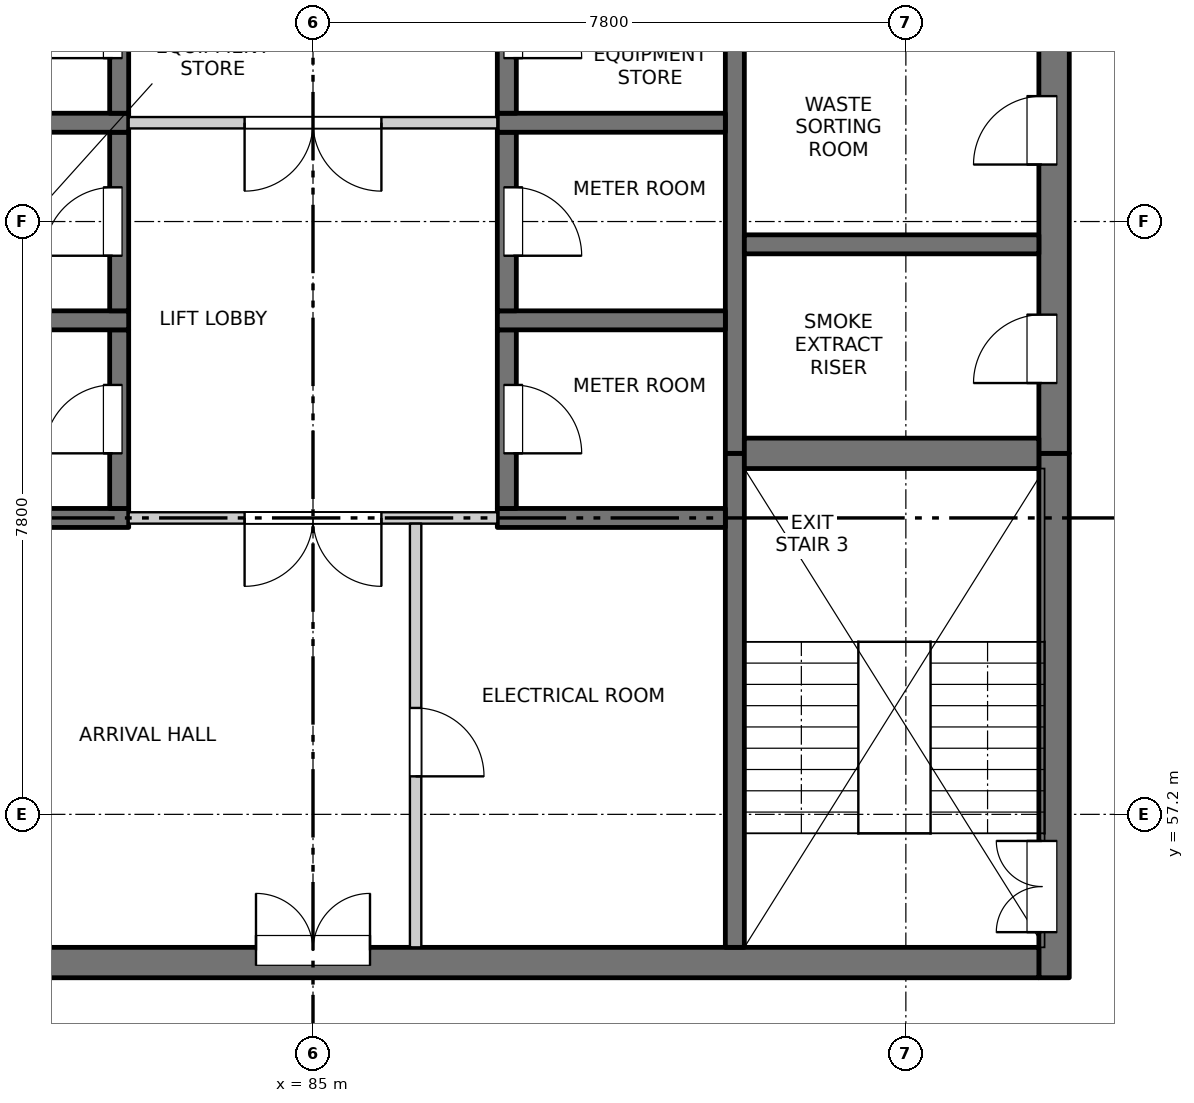
"""IFC4 building model, lengths in metres.
Left out: names, types, materials, properties, quantities, classifications, styles, units other than length and angle.
Written with IfcOpenShell. Run it as: python <this file> out.ifc"""

import sys

from ifc_helpers import new_model, si_unit, direction, frame, frame_2d, origin, place, context, subcontext, project, spatial, rectangle, extrude, element, fill, save


model = new_model("IFC4")
c1 = context("Model", 3, precision=1e-05, world=origin(), true_north=direction((0.0, 1.0)))
c2 = subcontext(c1, "Body", "Model", "MODEL_VIEW")
j1 = project(units=[si_unit("LENGTHUNIT", "METRE"), si_unit("PLANEANGLEUNIT", "RADIAN")], contexts=[c1])
p1 = place(None, origin())
s1 = spatial("IfcSite", under=j1, at=p1, CompositionType="ELEMENT")
p2 = place(p1, origin())
s2 = spatial("IfcBuilding", under=s1, at=p2, CompositionType="ELEMENT")
p3 = place(p2, frame((0.0, 0.0, 259.6)))
s3 = spatial("IfcBuildingStorey", under=s2, at=p3, CompositionType="ELEMENT", Elevation=259.6)
p4 = place(p3, frame((94.75, 55.05, -0.25), z_axis=(0.0, 0.0, 1.0), x_axis=(0.0, 1.0, 0.0)))
e1 = element("IfcWall", 1, at=p4, inside=s3, PredefinedType="SOLIDWALL", context=c2, shape_type="SweptSolid", body=[
    extrude(rectangle(XDim=6.9, YDim=0.4, at=frame_2d((3.45, 0.0))), origin(), (0.0, 0.0, 1.0), 3.4),
])
p5 = place(p4, frame((0.6, 0.0, 0.25)))
e2 = element("IfcOpeningElement", 2, at=p5, cuts=e1, PredefinedType="OPENING", context=c2, shape_type="SweptSolid", body=[
    extrude(rectangle(XDim=1.2, YDim=2.1, at=frame_2d((0.6, 1.05))), frame((0.0, 0.21, 0.0), z_axis=(0.0, -1.0, 0.0), x_axis=(1.0, 0.0, 0.0)), (0.0, 0.0, 1.0), 0.42),
])
p6 = place(p3, frame((94.75, 61.95, -0.25), z_axis=(0.0, 0.0, 1.0), x_axis=(0.0, 1.0, 0.0)))
e3 = element("IfcWall", 3, at=p6, inside=s3, PredefinedType="SOLIDWALL", context=c2, shape_type="SweptSolid", body=[
    extrude(rectangle(XDim=15.35, YDim=0.4, at=frame_2d((7.675, 0.0))), origin(), (0.0, 0.0, 1.0), 3.4),
])
p7 = place(p6, frame((0.925, 0.0, 0.25)))
e4 = element("IfcOpeningElement", 4, at=p7, cuts=e3, PredefinedType="OPENING", context=c2, shape_type="SweptSolid", body=[
    extrude(rectangle(XDim=0.9, YDim=2.1, at=frame_2d((0.45, 1.05))), frame((0.0, 0.21, 0.0), z_axis=(0.0, -1.0, 0.0), x_axis=(1.0, 0.0, 0.0)), (0.0, 0.0, 1.0), 0.42),
])
p8 = place(p6, frame((3.8, 0.0, 0.25)))
e5 = element("IfcOpeningElement", 5, at=p8, cuts=e3, PredefinedType="OPENING", context=c2, shape_type="SweptSolid", body=[
    extrude(rectangle(XDim=0.9, YDim=2.1, at=frame_2d((0.45, 1.05))), frame((0.0, 0.21, 0.0), z_axis=(0.0, -1.0, 0.0), x_axis=(1.0, 0.0, 0.0)), (0.0, 0.0, 1.0), 0.42),
])
p9 = place(p6, frame((8.3, 0.0, 0.25)))
e6 = element("IfcOpeningElement", 6, at=p9, cuts=e3, PredefinedType="OPENING", context=c2, shape_type="SweptSolid", body=[
    extrude(rectangle(XDim=0.9, YDim=2.1, at=frame_2d((0.45, 1.05))), frame((0.0, 0.21, 0.0), z_axis=(0.0, -1.0, 0.0), x_axis=(1.0, 0.0, 0.0)), (0.0, 0.0, 1.0), 0.42),
])
p10 = place(p6, frame((13.1, 0.0, 0.25)))
e7 = element("IfcOpeningElement", 7, at=p10, cuts=e3, PredefinedType="OPENING", context=c2, shape_type="SweptSolid", body=[
    extrude(rectangle(XDim=0.9, YDim=2.1, at=frame_2d((0.45, 1.05))), frame((0.0, 0.21, 0.0), z_axis=(0.0, -1.0, 0.0), x_axis=(1.0, 0.0, 0.0)), (0.0, 0.0, 1.0), 0.42),
])
p11 = place(p3, frame((75.45, 55.25, -0.25), z_axis=(0.0, 0.0, 1.0), x_axis=(1.0, 0.0, 0.0)))
e8 = element("IfcWall", 8, at=p11, inside=s3, PredefinedType="SOLIDWALL", context=c2, shape_type="SweptSolid", body=[
    extrude(rectangle(XDim=19.1, YDim=0.4, at=frame_2d((9.55, 0.0))), origin(), (0.0, 0.0, 1.0), 3.4),
])
p12 = place(p11, frame((8.8, 0.0, 0.25)))
e9 = element("IfcOpeningElement", 9, at=p12, cuts=e8, PredefinedType="OPENING", context=c2, shape_type="SweptSolid", body=[
    extrude(rectangle(XDim=1.5, YDim=2.1, at=frame_2d((0.75, 1.05))), frame((0.0, 0.21, 0.0), z_axis=(0.0, -1.0, 0.0), x_axis=(1.0, 0.0, 0.0)), (0.0, 0.0, 1.0), 0.42),
])
p13 = place(p3, frame((90.55, 55.45, -0.25), z_axis=(0.0, 0.0, 1.0), x_axis=(0.0, 1.0, 0.0)))
e10 = element("IfcWall", 10, at=p13, inside=s3, PredefinedType="SOLIDWALL", context=c2, shape_type="SweptSolid", body=[
    extrude(rectangle(XDim=6.5, YDim=0.25, at=frame_2d((3.25, 0.0))), origin(), (0.0, 0.0, 1.0), 3.4),
])
p14 = place(p3, frame((90.55, 61.95, -0.25), z_axis=(0.0, 0.0, 1.0), x_axis=(0.0, 1.0, 0.0)))
e11 = element("IfcWall", 11, at=p14, inside=s3, PredefinedType="SOLIDWALL", context=c2, shape_type="SweptSolid", body=[
    extrude(rectangle(XDim=15.35, YDim=0.25, at=frame_2d((7.675, 0.0))), origin(), (0.0, 0.0, 1.0), 3.4),
])
p15 = place(p3, frame((79.575, 61.1, -0.25), z_axis=(0.0, 0.0, 1.0), x_axis=(1.0, 0.0, 0.0)))
e12 = element("IfcWall", 12, at=p15, inside=s3, PredefinedType="SOLIDWALL", context=c2, shape_type="SweptSolid", body=[
    extrude(rectangle(XDim=3.0, YDim=0.25, at=frame_2d((1.5, 0.0))), origin(), (0.0, 0.0, 1.0), 3.4),
])
p16 = place(p3, frame((82.45, 61.225, -0.25), z_axis=(0.0, 0.0, 1.0), x_axis=(0.0, 1.0, 0.0)))
e13 = element("IfcWall", 13, at=p16, inside=s3, PredefinedType="SOLIDWALL", context=c2, shape_type="SweptSolid", body=[
    extrude(rectangle(XDim=2.35, YDim=0.25, at=frame_2d((1.175, 0.0))), origin(), (0.0, 0.0, 1.0), 3.4),
])
p17 = place(p16, frame((0.725, 0.0, 0.25)))
e14 = element("IfcOpeningElement", 14, at=p17, cuts=e13, PredefinedType="OPENING", context=c2, shape_type="SweptSolid", body=[
    extrude(rectangle(XDim=0.9, YDim=2.1, at=frame_2d((0.45, 1.05))), frame((0.0, 0.135, 0.0), z_axis=(0.0, -1.0, 0.0), x_axis=(1.0, 0.0, 0.0)), (0.0, 0.0, 1.0), 0.27),
])
p18 = place(p3, frame((79.575, 63.7, -0.25), z_axis=(0.0, 0.0, 1.0), x_axis=(1.0, 0.0, 0.0)))
e15 = element("IfcWall", 15, at=p18, inside=s3, PredefinedType="SOLIDWALL", context=c2, shape_type="SweptSolid", body=[
    extrude(rectangle(XDim=3.0, YDim=0.25, at=frame_2d((1.5, 0.0))), origin(), (0.0, 0.0, 1.0), 3.4),
])
p19 = place(p3, frame((82.45, 63.825, -0.25), z_axis=(0.0, 0.0, 1.0), x_axis=(0.0, 1.0, 0.0)))
e16 = element("IfcWall", 16, at=p19, inside=s3, PredefinedType="SOLIDWALL", context=c2, shape_type="SweptSolid", body=[
    extrude(rectangle(XDim=2.35, YDim=0.25, at=frame_2d((1.175, 0.0))), origin(), (0.0, 0.0, 1.0), 3.4),
])
p20 = place(p19, frame((0.725, 0.0, 0.25)))
e17 = element("IfcOpeningElement", 17, at=p20, cuts=e16, PredefinedType="OPENING", context=c2, shape_type="SweptSolid", body=[
    extrude(rectangle(XDim=0.9, YDim=2.1, at=frame_2d((0.45, 1.05))), frame((0.0, 0.135, 0.0), z_axis=(0.0, -1.0, 0.0), x_axis=(1.0, 0.0, 0.0)), (0.0, 0.0, 1.0), 0.27),
])
p21 = place(p3, frame((79.575, 66.3, -0.25), z_axis=(0.0, 0.0, 1.0), x_axis=(1.0, 0.0, 0.0)))
e18 = element("IfcWall", 18, at=p21, inside=s3, PredefinedType="SOLIDWALL", context=c2, shape_type="SweptSolid", body=[
    extrude(rectangle(XDim=3.0, YDim=0.25, at=frame_2d((1.5, 0.0))), origin(), (0.0, 0.0, 1.0), 3.4),
])
p22 = place(p3, frame((82.45, 66.425, -0.25), z_axis=(0.0, 0.0, 1.0), x_axis=(0.0, 1.0, 0.0)))
e19 = element("IfcWall", 19, at=p22, inside=s3, PredefinedType="SOLIDWALL", context=c2, shape_type="SweptSolid", body=[
    extrude(rectangle(XDim=2.35, YDim=0.25, at=frame_2d((1.175, 0.0))), origin(), (0.0, 0.0, 1.0), 3.4),
])
p23 = place(p22, frame((0.725, 0.0, 0.25)))
e20 = element("IfcOpeningElement", 20, at=p23, cuts=e19, PredefinedType="OPENING", context=c2, shape_type="SweptSolid", body=[
    extrude(rectangle(XDim=0.9, YDim=2.1, at=frame_2d((0.45, 1.05))), frame((0.0, 0.135, 0.0), z_axis=(0.0, -1.0, 0.0), x_axis=(1.0, 0.0, 0.0)), (0.0, 0.0, 1.0), 0.27),
])
p24 = place(p3, frame((87.425, 61.1, -0.25), z_axis=(0.0, 0.0, 1.0), x_axis=(1.0, 0.0, 0.0)))
e21 = element("IfcWall", 21, at=p24, inside=s3, PredefinedType="SOLIDWALL", context=c2, shape_type="SweptSolid", body=[
    extrude(rectangle(XDim=3.0, YDim=0.25, at=frame_2d((1.5, 0.0))), origin(), (0.0, 0.0, 1.0), 3.4),
])
p25 = place(p3, frame((87.55, 61.225, -0.25), z_axis=(0.0, 0.0, 1.0), x_axis=(0.0, 1.0, 0.0)))
e22 = element("IfcWall", 22, at=p25, inside=s3, PredefinedType="SOLIDWALL", context=c2, shape_type="SweptSolid", body=[
    extrude(rectangle(XDim=2.35, YDim=0.25, at=frame_2d((1.175, 0.0))), origin(), (0.0, 0.0, 1.0), 3.4),
])
p26 = place(p25, frame((0.725, 0.0, 0.25)))
e23 = element("IfcOpeningElement", 23, at=p26, cuts=e22, PredefinedType="OPENING", context=c2, shape_type="SweptSolid", body=[
    extrude(rectangle(XDim=0.9, YDim=2.1, at=frame_2d((0.45, 1.05))), frame((0.0, 0.135, 0.0), z_axis=(0.0, -1.0, 0.0), x_axis=(1.0, 0.0, 0.0)), (0.0, 0.0, 1.0), 0.27),
])
p27 = place(p3, frame((87.425, 63.7, -0.25), z_axis=(0.0, 0.0, 1.0), x_axis=(1.0, 0.0, 0.0)))
e24 = element("IfcWall", 24, at=p27, inside=s3, PredefinedType="SOLIDWALL", context=c2, shape_type="SweptSolid", body=[
    extrude(rectangle(XDim=3.0, YDim=0.25, at=frame_2d((1.5, 0.0))), origin(), (0.0, 0.0, 1.0), 3.4),
])
p28 = place(p3, frame((87.55, 63.825, -0.25), z_axis=(0.0, 0.0, 1.0), x_axis=(0.0, 1.0, 0.0)))
e25 = element("IfcWall", 25, at=p28, inside=s3, PredefinedType="SOLIDWALL", context=c2, shape_type="SweptSolid", body=[
    extrude(rectangle(XDim=2.35, YDim=0.25, at=frame_2d((1.175, 0.0))), origin(), (0.0, 0.0, 1.0), 3.4),
])
p29 = place(p28, frame((0.725, 0.0, 0.25)))
e26 = element("IfcOpeningElement", 26, at=p29, cuts=e25, PredefinedType="OPENING", context=c2, shape_type="SweptSolid", body=[
    extrude(rectangle(XDim=0.9, YDim=2.1, at=frame_2d((0.45, 1.05))), frame((0.0, 0.135, 0.0), z_axis=(0.0, -1.0, 0.0), x_axis=(1.0, 0.0, 0.0)), (0.0, 0.0, 1.0), 0.27),
])
p30 = place(p3, frame((87.425, 66.3, -0.25), z_axis=(0.0, 0.0, 1.0), x_axis=(1.0, 0.0, 0.0)))
e27 = element("IfcWall", 27, at=p30, inside=s3, PredefinedType="SOLIDWALL", context=c2, shape_type="SweptSolid", body=[
    extrude(rectangle(XDim=3.0, YDim=0.25, at=frame_2d((1.5, 0.0))), origin(), (0.0, 0.0, 1.0), 3.4),
])
p31 = place(p3, frame((87.55, 66.425, -0.25), z_axis=(0.0, 0.0, 1.0), x_axis=(0.0, 1.0, 0.0)))
e28 = element("IfcWall", 28, at=p31, inside=s3, PredefinedType="SOLIDWALL", context=c2, shape_type="SweptSolid", body=[
    extrude(rectangle(XDim=2.35, YDim=0.25, at=frame_2d((1.175, 0.0))), origin(), (0.0, 0.0, 1.0), 3.4),
])
p32 = place(p31, frame((0.725, 0.0, 0.25)))
e29 = element("IfcOpeningElement", 29, at=p32, cuts=e28, PredefinedType="OPENING", context=c2, shape_type="SweptSolid", body=[
    extrude(rectangle(XDim=0.9, YDim=2.1, at=frame_2d((0.45, 1.05))), frame((0.0, 0.135, 0.0), z_axis=(0.0, -1.0, 0.0), x_axis=(1.0, 0.0, 0.0)), (0.0, 0.0, 1.0), 0.27),
])
p33 = place(p3, frame((90.675, 61.95, -0.25), z_axis=(0.0, 0.0, 1.0), x_axis=(1.0, 0.0, 0.0)))
e30 = element("IfcWall", 30, at=p33, inside=s3, PredefinedType="SOLIDWALL", context=c2, shape_type="SweptSolid", body=[
    extrude(rectangle(XDim=3.875, YDim=0.4, at=frame_2d((1.938, 0.0))), origin(), (0.0, 0.0, 1.0), 3.4),
])
p34 = place(p3, frame((90.675, 64.7, -0.25), z_axis=(0.0, 0.0, 1.0), x_axis=(1.0, 0.0, 0.0)))
e31 = element("IfcWall", 31, at=p34, inside=s3, PredefinedType="SOLIDWALL", context=c2, shape_type="SweptSolid", body=[
    extrude(rectangle(XDim=3.875, YDim=0.25, at=frame_2d((1.938, 0.0))), origin(), (0.0, 0.0, 1.0), 3.4),
])
p35 = place(p3, frame((82.575, 61.1, 0.0), z_axis=(0.0, 0.0, 1.0), x_axis=(1.0, 0.0, 0.0)))
e32 = element("IfcWall", 32, at=p35, inside=s3, PredefinedType="PARTITIONING", context=c2, shape_type="SweptSolid", body=[
    extrude(rectangle(XDim=4.85, YDim=0.15, at=frame_2d((2.425, 0.0))), origin(), (0.0, 0.0, 1.0), 3.15),
])
p36 = place(p35, frame((1.525, 0.0, 0.0)))
e33 = element("IfcOpeningElement", 33, at=p36, cuts=e32, PredefinedType="OPENING", context=c2, shape_type="SweptSolid", body=[
    extrude(rectangle(XDim=1.8, YDim=2.1, at=frame_2d((0.9, 1.05))), frame((0.0, 0.085, 0.0), z_axis=(0.0, -1.0, 0.0), x_axis=(1.0, 0.0, 0.0)), (0.0, 0.0, 1.0), 0.17),
])
p37 = place(p3, frame((82.575, 66.3, 0.0), z_axis=(0.0, 0.0, 1.0), x_axis=(1.0, 0.0, 0.0)))
e34 = element("IfcWall", 34, at=p37, inside=s3, PredefinedType="PARTITIONING", context=c2, shape_type="SweptSolid", body=[
    extrude(rectangle(XDim=4.85, YDim=0.15, at=frame_2d((2.425, 0.0))), origin(), (0.0, 0.0, 1.0), 3.15),
])
p38 = place(p37, frame((1.525, 0.0, 0.0)))
e35 = element("IfcOpeningElement", 35, at=p38, cuts=e34, PredefinedType="OPENING", context=c2, shape_type="SweptSolid", body=[
    extrude(rectangle(XDim=1.8, YDim=2.1, at=frame_2d((0.9, 1.05))), frame((0.0, 0.085, 0.0), z_axis=(0.0, -1.0, 0.0), x_axis=(1.0, 0.0, 0.0)), (0.0, 0.0, 1.0), 0.17),
])
p39 = place(p3, frame((86.35, 55.45, 0.0), z_axis=(0.0, 0.0, 1.0), x_axis=(0.0, 1.0, 0.0)))
e36 = element("IfcWall", 36, at=p39, inside=s3, PredefinedType="PARTITIONING", context=c2, shape_type="SweptSolid", body=[
    extrude(rectangle(XDim=5.575, YDim=0.15, at=frame_2d((2.788, 0.0))), origin(), (0.0, 0.0, 1.0), 3.15),
])
p40 = place(p39, frame((2.25, 0.0, 0.0)))
e37 = element("IfcOpeningElement", 37, at=p40, cuts=e36, PredefinedType="OPENING", context=c2, shape_type="SweptSolid", body=[
    extrude(rectangle(XDim=0.9, YDim=2.1, at=frame_2d((0.45, 1.05))), frame((0.0, 0.085, 0.0), z_axis=(0.0, -1.0, 0.0), x_axis=(1.0, 0.0, 0.0)), (0.0, 0.0, 1.0), 0.17),
])
p41 = place(p12, origin())
e38 = element("IfcDoor", 38, at=p41, inside=s3, OperationType="DOUBLE_DOOR_SINGLE_SWING", PredefinedType="DOOR", context=c2, shape_type="SweptSolid", body=[
    extrude(rectangle(XDim=1.5, YDim=2.1, at=frame_2d((0.75, 1.05))), frame((0.0, 0.185, 0.0), z_axis=(0.0, -1.0, 0.0), x_axis=(1.0, 0.0, 0.0)), (0.0, 0.0, 1.0), 0.05),
])
fill(e9, e38)
p42 = place(p5, origin())
e39 = element("IfcDoor", 39, at=p42, inside=s3, OperationType="DOUBLE_DOOR_SINGLE_SWING", PredefinedType="DOOR", context=c2, shape_type="SweptSolid", body=[
    extrude(rectangle(XDim=1.2, YDim=2.1, at=frame_2d((0.6, 1.05))), frame((0.0, 0.185, 0.0), z_axis=(0.0, -1.0, 0.0), x_axis=(1.0, 0.0, 0.0)), (0.0, 0.0, 1.0), 0.05),
])
fill(e2, e39)
p43 = place(p40, origin())
e40 = element("IfcDoor", 40, at=p43, inside=s3, OperationType="SINGLE_SWING_RIGHT", PredefinedType="DOOR", context=c2, shape_type="SweptSolid", body=[
    extrude(rectangle(XDim=0.9, YDim=2.1, at=frame_2d((0.45, 1.05))), frame((0.0, 0.025, 0.0), z_axis=(0.0, -1.0, 0.0), x_axis=(1.0, 0.0, 0.0)), (0.0, 0.0, 1.0), 0.05),
])
fill(e37, e40)
p44 = place(p36, origin())
e41 = element("IfcDoor", 41, at=p44, inside=s3, OperationType="DOUBLE_DOOR_SINGLE_SWING", PredefinedType="DOOR", context=c2, shape_type="SweptSolid", body=[
    extrude(rectangle(XDim=1.8, YDim=2.1, at=frame_2d((0.9, 1.05))), frame((0.0, 0.025, 0.0), z_axis=(0.0, -1.0, 0.0), x_axis=(1.0, 0.0, 0.0)), (0.0, 0.0, 1.0), 0.05),
])
fill(e33, e41)
p45 = place(p17, origin())
e42 = element("IfcDoor", 42, at=p45, inside=s3, OperationType="SINGLE_SWING_LEFT", PredefinedType="DOOR", context=c2, shape_type="SweptSolid", body=[
    extrude(rectangle(XDim=0.9, YDim=2.1, at=frame_2d((0.45, 1.05))), frame((0.0, 0.11, 0.0), z_axis=(0.0, -1.0, 0.0), x_axis=(1.0, 0.0, 0.0)), (0.0, 0.0, 1.0), 0.05),
])
fill(e14, e42)
p46 = place(p26, origin())
e43 = element("IfcDoor", 43, at=p46, inside=s3, OperationType="SINGLE_SWING_RIGHT", PredefinedType="DOOR", context=c2, shape_type="SweptSolid", body=[
    extrude(rectangle(XDim=0.9, YDim=2.1, at=frame_2d((0.45, 1.05))), frame((0.0, -0.06, 0.0), z_axis=(0.0, -1.0, 0.0), x_axis=(1.0, 0.0, 0.0)), (0.0, 0.0, 1.0), 0.05),
])
fill(e23, e43)
p47 = place(p7, origin())
e44 = element("IfcDoor", 44, at=p47, inside=s3, OperationType="SINGLE_SWING_LEFT", PredefinedType="DOOR", context=c2, shape_type="SweptSolid", body=[
    extrude(rectangle(XDim=0.9, YDim=2.1, at=frame_2d((0.45, 1.05))), frame((0.0, 0.185, 0.0), z_axis=(0.0, -1.0, 0.0), x_axis=(1.0, 0.0, 0.0)), (0.0, 0.0, 1.0), 0.05),
])
fill(e4, e44)
p48 = place(p20, origin())
e45 = element("IfcDoor", 45, at=p48, inside=s3, OperationType="SINGLE_SWING_LEFT", PredefinedType="DOOR", context=c2, shape_type="SweptSolid", body=[
    extrude(rectangle(XDim=0.9, YDim=2.1, at=frame_2d((0.45, 1.05))), frame((0.0, 0.11, 0.0), z_axis=(0.0, -1.0, 0.0), x_axis=(1.0, 0.0, 0.0)), (0.0, 0.0, 1.0), 0.05),
])
fill(e17, e45)
p49 = place(p29, origin())
e46 = element("IfcDoor", 46, at=p49, inside=s3, OperationType="SINGLE_SWING_RIGHT", PredefinedType="DOOR", context=c2, shape_type="SweptSolid", body=[
    extrude(rectangle(XDim=0.9, YDim=2.1, at=frame_2d((0.45, 1.05))), frame((0.0, -0.06, 0.0), z_axis=(0.0, -1.0, 0.0), x_axis=(1.0, 0.0, 0.0)), (0.0, 0.0, 1.0), 0.05),
])
fill(e26, e46)
p50 = place(p8, origin())
e47 = element("IfcDoor", 47, at=p50, inside=s3, OperationType="SINGLE_SWING_LEFT", PredefinedType="DOOR", context=c2, shape_type="SweptSolid", body=[
    extrude(rectangle(XDim=0.9, YDim=2.1, at=frame_2d((0.45, 1.05))), frame((0.0, 0.185, 0.0), z_axis=(0.0, -1.0, 0.0), x_axis=(1.0, 0.0, 0.0)), (0.0, 0.0, 1.0), 0.05),
])
fill(e5, e47)
p51 = place(p38, origin())
e48 = element("IfcDoor", 48, at=p51, inside=s3, OperationType="DOUBLE_DOOR_SINGLE_SWING", PredefinedType="DOOR", context=c2, shape_type="SweptSolid", body=[
    extrude(rectangle(XDim=1.8, YDim=2.1, at=frame_2d((0.9, 1.05))), frame((0.0, 0.025, 0.0), z_axis=(0.0, -1.0, 0.0), x_axis=(1.0, 0.0, 0.0)), (0.0, 0.0, 1.0), 0.05),
])
fill(e35, e48)
p52 = place(p23, origin())
e49 = element("IfcDoor", 49, at=p52, inside=s3, OperationType="SINGLE_SWING_LEFT", PredefinedType="DOOR", context=c2, shape_type="SweptSolid", body=[
    extrude(rectangle(XDim=0.9, YDim=2.1, at=frame_2d((0.45, 1.05))), frame((0.0, 0.11, 0.0), z_axis=(0.0, -1.0, 0.0), x_axis=(1.0, 0.0, 0.0)), (0.0, 0.0, 1.0), 0.05),
])
fill(e20, e49)
p53 = place(p32, origin())
e50 = element("IfcDoor", 50, at=p53, inside=s3, OperationType="SINGLE_SWING_RIGHT", PredefinedType="DOOR", context=c2, shape_type="SweptSolid", body=[
    extrude(rectangle(XDim=0.9, YDim=2.1, at=frame_2d((0.45, 1.05))), frame((0.0, -0.06, 0.0), z_axis=(0.0, -1.0, 0.0), x_axis=(1.0, 0.0, 0.0)), (0.0, 0.0, 1.0), 0.05),
])
fill(e29, e50)
save(model, sys.argv[1])
